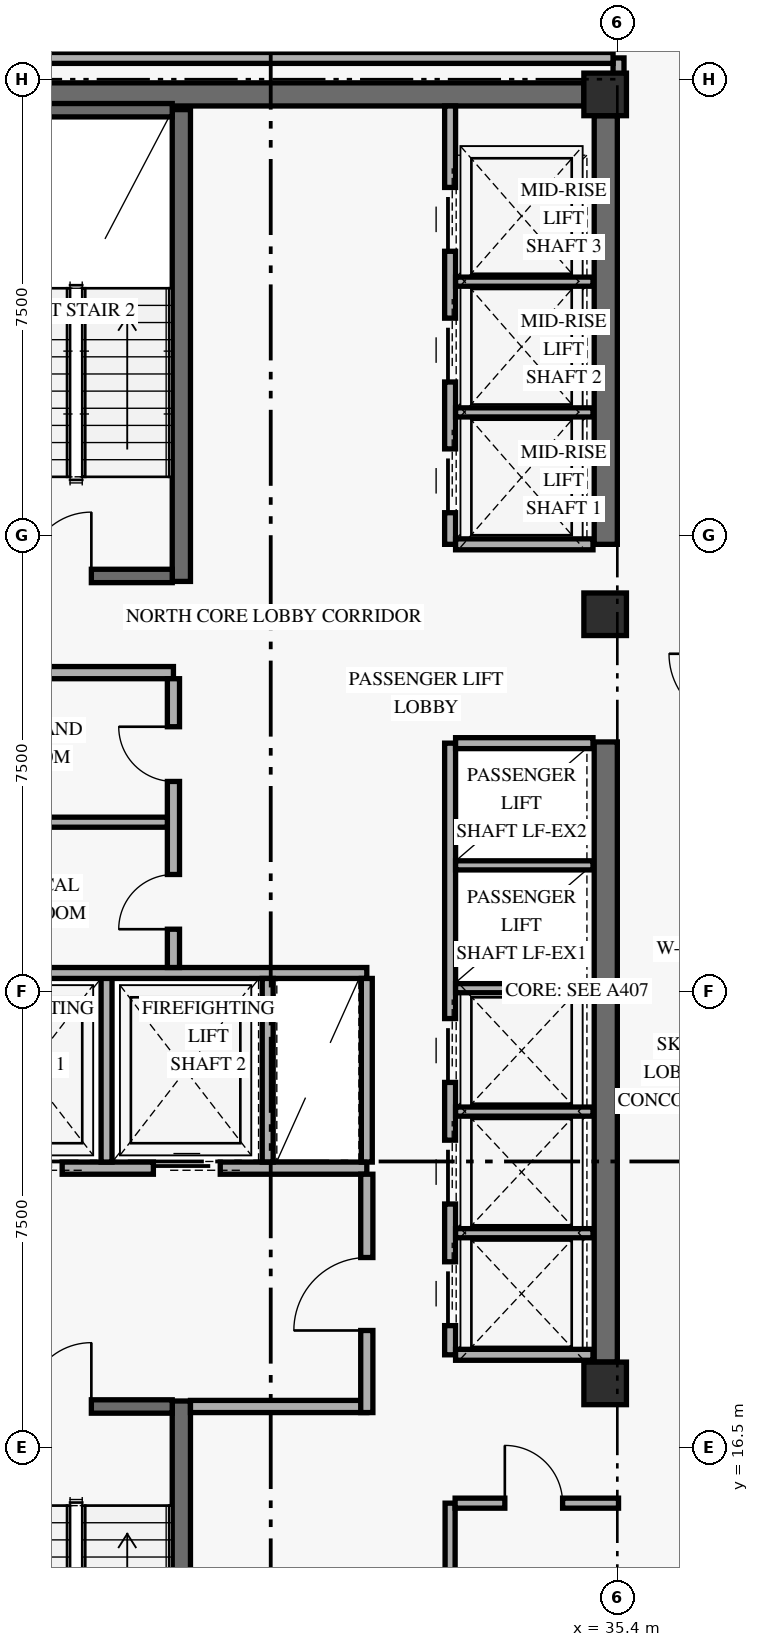
"""IFC4 building model, lengths in metres.
Left out: names, types, materials, properties, quantities, classifications, styles, units other than length and angle.
Written with IfcOpenShell. Run it as: python <this file> out.ifc"""

import sys

from ifc_helpers import new_model, si_unit, direction, frame, frame_2d, origin, origin_2d, place, context, subcontext, project, spatial, rectangle, extrude, element, fill, save


model = new_model("IFC4")
c1 = context("Model", 3, precision=1e-05, world=origin(), true_north=direction((0.0, 1.0)))
c2 = subcontext(c1, "Body", "Model", "MODEL_VIEW")
j1 = project(units=[si_unit("LENGTHUNIT", "METRE"), si_unit("PLANEANGLEUNIT", "RADIAN")], contexts=[c1])
p1 = place(None, origin())
s1 = spatial("IfcSite", under=j1, at=p1, CompositionType="ELEMENT")
p2 = place(p1, origin())
s2 = spatial("IfcBuilding", under=s1, at=p2, CompositionType="ELEMENT")
p3 = place(p2, frame((0.0, 0.0, 192.0)))
s3 = spatial("IfcBuildingStorey", under=s2, at=p3, CompositionType="ELEMENT", Elevation=192.0)
p4 = place(p3, frame((35.21, 17.9, 0.0), z_axis=(0.0, 0.0, 1.0), x_axis=(0.0, 1.0, 0.0)))
e1 = element("IfcWall", 1, at=p4, inside=s3, PredefinedType="SHEAR", context=c2, shape_type="SweptSolid", body=[
    extrude(rectangle(XDim=10.2, YDim=0.38, at=frame_2d((5.1, 0.0))), origin(), (0.0, 0.0, 1.0), 3.348),
])
p5 = place(p3, frame((35.21, 31.35, 0.0), z_axis=(0.0, 0.0, 1.0), x_axis=(0.0, 1.0, 0.0)))
e2 = element("IfcWall", 2, at=p5, inside=s3, PredefinedType="SHEAR", context=c2, shape_type="SweptSolid", body=[
    extrude(rectangle(XDim=7.05, YDim=0.38, at=frame_2d((3.525, 0.0))), origin(), (0.0, 0.0, 1.0), 3.348),
])
p6 = place(p3, frame((24.55, 38.75, 0.0), z_axis=(0.0, 0.0, 1.0), x_axis=(1.0, 0.0, 0.0)))
e3 = element("IfcWall", 3, at=p6, inside=s3, PredefinedType="SHEAR", context=c2, shape_type="SweptSolid", body=[
    extrude(rectangle(XDim=10.3, YDim=0.38, at=frame_2d((5.15, 0.0))), origin(), (0.0, 0.0, 1.0), 3.96),
])
p7 = place(p3, frame((28.23, 9.5, 0.0), z_axis=(0.0, 0.0, 1.0), x_axis=(0.0, 1.0, 0.0)))
e4 = element("IfcWall", 4, at=p7, inside=s3, PredefinedType="SHEAR", context=c2, shape_type="SweptSolid", body=[
    extrude(rectangle(XDim=7.76, YDim=0.3, at=frame_2d((3.88, 0.0))), origin(), (0.0, 0.0, 1.0), 3.96),
])
p8 = place(p3, frame((24.92, 17.17, 0.0), z_axis=(0.0, 0.0, 1.0), x_axis=(1.0, 0.0, 0.0)))
e5 = element("IfcWall", 5, at=p8, inside=s3, PredefinedType="SHEAR", context=c2, shape_type="SweptSolid", body=[
    extrude(rectangle(XDim=3.16, YDim=0.22, at=frame_2d((1.58, 0.0))), origin(), (0.0, 0.0, 1.0), 3.96),
])
p9 = place(p8, frame((0.78, 0.0, 0.0)))
e6 = element("IfcOpeningElement", 6, at=p9, cuts=e5, PredefinedType="OPENING", context=c2, shape_type="SweptSolid", body=[
    extrude(rectangle(XDim=1.05, YDim=2.15, at=frame_2d((0.525, 1.075))), frame((0.0, 0.12, 0.0), z_axis=(0.0, -1.0, 0.0), x_axis=(1.0, 0.0, 0.0)), (0.0, 0.0, 1.0), 0.24),
])
p10 = place(p3, frame((28.23, 30.74, 0.0), z_axis=(0.0, 0.0, 1.0), x_axis=(0.0, 1.0, 0.0)))
e7 = element("IfcWall", 7, at=p10, inside=s3, PredefinedType="SHEAR", context=c2, shape_type="SweptSolid", body=[
    extrude(rectangle(XDim=7.76, YDim=0.3, at=frame_2d((3.88, 0.0))), origin(), (0.0, 0.0, 1.0), 3.96),
])
p11 = place(p3, frame((24.92, 30.83, 0.0), z_axis=(0.0, 0.0, 1.0), x_axis=(1.0, 0.0, 0.0)))
e8 = element("IfcWall", 8, at=p11, inside=s3, PredefinedType="SHEAR", context=c2, shape_type="SweptSolid", body=[
    extrude(rectangle(XDim=3.16, YDim=0.22, at=frame_2d((1.58, 0.0))), origin(), (0.0, 0.0, 1.0), 3.96),
])
p12 = place(p11, frame((0.78, 0.0, 0.0)))
e9 = element("IfcOpeningElement", 9, at=p12, cuts=e8, PredefinedType="OPENING", context=c2, shape_type="SweptSolid", body=[
    extrude(rectangle(XDim=1.05, YDim=2.15, at=frame_2d((0.525, 1.075))), frame((0.0, 0.12, 0.0), z_axis=(0.0, -1.0, 0.0), x_axis=(1.0, 0.0, 0.0)), (0.0, 0.0, 1.0), 0.24),
])
p13 = place(p3, frame((24.92, 38.49, 0.0), z_axis=(0.0, 0.0, 1.0), x_axis=(1.0, 0.0, 0.0)))
e10 = element("IfcWall", 10, at=p13, inside=s3, PredefinedType="SHEAR", context=c2, shape_type="SweptSolid", body=[
    extrude(rectangle(XDim=3.16, YDim=0.22, at=frame_2d((1.58, 0.0))), origin(), (0.0, 0.0, 1.0), 3.96),
])
for number, where, z_axis, x_axis in (
    (11, (35.2, 17.55, 0.0), (0.0, 0.0, 1.0), (1.0, 0.0, 0.0)),
    (12, (35.2, 30.2, 0.0), (0.0, 0.0, 1.0), (1.0, 0.0, 0.0)),
    (13, (35.2, 38.75, 0.0), (0.0, 0.0, 1.0), (1.0, 0.0, 0.0)),
):
    element("IfcColumn", number, at=place(p3, frame(where, z_axis=z_axis, x_axis=x_axis)), inside=s3, PredefinedType="COLUMN", context=c2, shape_type="SweptSolid", body=[
        extrude(rectangle(XDim=0.7, YDim=0.7, at=origin_2d()), origin(), (0.0, 0.0, 1.0), 4.2),
    ])
p14 = place(p3, frame((24.45, 21.09, 0.0), z_axis=(0.0, 0.0, 1.0), x_axis=(1.0, 0.0, 0.0)))
e14 = element("IfcWall", 14, at=p14, inside=s3, PredefinedType="STANDARD", context=c2, shape_type="SweptSolid", body=[
    extrude(rectangle(XDim=6.83, YDim=0.2, at=frame_2d((3.415, 0.0))), origin(), (0.0, 0.0, 1.0), 3.96),
])
p15 = place(p14, frame((0.72, 0.0, 0.0)))
e15 = element("IfcOpeningElement", 15, at=p15, cuts=e14, PredefinedType="OPENING", context=c2, shape_type="SweptSolid", body=[
    extrude(rectangle(XDim=1.1, YDim=2.2, at=frame_2d((0.55, 1.1))), frame((0.0, 0.11, 0.0), z_axis=(0.0, -1.0, 0.0), x_axis=(1.0, 0.0, 0.0)), (0.0, 0.0, 1.0), 0.22),
])
p16 = place(p14, frame((3.32, 0.0, 0.0)))
e16 = element("IfcOpeningElement", 16, at=p16, cuts=e14, PredefinedType="OPENING", context=c2, shape_type="SweptSolid", body=[
    extrude(rectangle(XDim=1.1, YDim=2.2, at=frame_2d((0.55, 1.1))), frame((0.0, 0.11, 0.0), z_axis=(0.0, -1.0, 0.0), x_axis=(1.0, 0.0, 0.0)), (0.0, 0.0, 1.0), 0.22),
])
p17 = place(p3, frame((28.38, 17.17, 0.0), z_axis=(0.0, 0.0, 1.0), x_axis=(1.0, 0.0, 0.0)))
e17 = element("IfcWall", 17, at=p17, inside=s3, PredefinedType="STANDARD", context=c2, shape_type="SweptSolid", body=[
    extrude(rectangle(XDim=2.9, YDim=0.2, at=frame_2d((1.45, 0.0))), origin(), (0.0, 0.0, 1.0), 3.96),
])
p18 = place(p3, frame((31.28, 17.07, 0.0), z_axis=(0.0, 0.0, 1.0), x_axis=(0.0, 1.0, 0.0)))
e18 = element("IfcWall", 18, at=p18, inside=s3, PredefinedType="STANDARD", context=c2, shape_type="SweptSolid", body=[
    extrude(rectangle(XDim=3.92, YDim=0.2, at=frame_2d((1.96, 0.0))), origin(), (0.0, 0.0, 1.0), 3.33),
])
p19 = place(p18, frame((1.35, 0.0, 0.0)))
e19 = element("IfcOpeningElement", 19, at=p19, cuts=e18, PredefinedType="OPENING", context=c2, shape_type="SweptSolid", body=[
    extrude(rectangle(XDim=1.2, YDim=2.15, at=frame_2d((0.6, 1.075))), frame((0.0, 0.11, 0.0), z_axis=(0.0, -1.0, 0.0), x_axis=(1.0, 0.0, 0.0)), (0.0, 0.0, 1.0), 0.22),
])
p20 = place(p3, frame((27.0, 21.19, 0.0), z_axis=(0.0, 0.0, 1.0), x_axis=(0.0, 1.0, 0.0)))
e20 = element("IfcWall", 20, at=p20, inside=s3, PredefinedType="STANDARD", context=c2, shape_type="SweptSolid", body=[
    extrude(rectangle(XDim=3.11, YDim=0.18, at=frame_2d((1.555, 0.0))), origin(), (0.0, 0.0, 1.0), 3.96),
])
p21 = place(p3, frame((24.45, 24.3, 0.0), z_axis=(0.0, 0.0, 1.0), x_axis=(1.0, 0.0, 0.0)))
e21 = element("IfcWall", 21, at=p21, inside=s3, PredefinedType="STANDARD", context=c2, shape_type="SweptSolid", body=[
    extrude(rectangle(XDim=6.83, YDim=0.18, at=frame_2d((3.415, 0.0))), origin(), (0.0, 0.0, 1.0), 3.96),
])
for number, where, z_axis, x_axis in (
    (22, (29.65, 21.19, 0.0), (0.0, 0.0, 1.0), (0.0, 1.0, 0.0)),
    (23, (31.28, 21.19, 0.0), (0.0, 0.0, 1.0), (0.0, 1.0, 0.0)),
):
    element("IfcWall", number, at=place(p3, frame(where, z_axis=z_axis, x_axis=x_axis)), inside=s3, PredefinedType="STANDARD", context=c2, shape_type="SweptSolid", body=[
        extrude(rectangle(XDim=3.02, YDim=0.18, at=frame_2d((1.51, 0.0))), origin(), (0.0, 0.0, 1.0), 3.96),
    ])
p22 = place(p3, frame((24.45, 29.24, 0.0), z_axis=(0.0, 0.0, 1.0), x_axis=(1.0, 0.0, 0.0)))
e24 = element("IfcWall", 24, at=p22, inside=s3, PredefinedType="STANDARD", context=c2, shape_type="SweptSolid", body=[
    extrude(rectangle(XDim=3.65, YDim=0.2, at=frame_2d((1.825, 0.0))), origin(), (0.0, 0.0, 1.0), 3.96),
])
p23 = place(p3, frame((28.1, 24.39, 0.0), z_axis=(0.0, 0.0, 1.0), x_axis=(0.0, 1.0, 0.0)))
e25 = element("IfcWall", 25, at=p23, inside=s3, PredefinedType="STANDARD", context=c2, shape_type="SweptSolid", body=[
    extrude(rectangle(XDim=4.75, YDim=0.2, at=frame_2d((2.375, 0.0))), origin(), (0.0, 0.0, 1.0), 3.96),
])
p24 = place(p23, frame((0.63, 0.0, 0.0)))
e26 = element("IfcOpeningElement", 26, at=p24, cuts=e25, PredefinedType="OPENING", context=c2, shape_type="SweptSolid", body=[
    extrude(rectangle(XDim=0.9, YDim=2.1, at=frame_2d((0.45, 1.05))), frame((0.0, 0.11, 0.0), z_axis=(0.0, -1.0, 0.0), x_axis=(1.0, 0.0, 0.0)), (0.0, 0.0, 1.0), 0.22),
])
p25 = place(p23, frame((3.06, 0.0, 0.0)))
e27 = element("IfcOpeningElement", 27, at=p25, cuts=e25, PredefinedType="OPENING", context=c2, shape_type="SweptSolid", body=[
    extrude(rectangle(XDim=0.9, YDim=2.1, at=frame_2d((0.45, 1.05))), frame((0.0, 0.11, 0.0), z_axis=(0.0, -1.0, 0.0), x_axis=(1.0, 0.0, 0.0)), (0.0, 0.0, 1.0), 0.22),
])
p26 = place(p3, frame((24.45, 26.78, 0.0), z_axis=(0.0, 0.0, 1.0), x_axis=(1.0, 0.0, 0.0)))
e28 = element("IfcWall", 28, at=p26, inside=s3, PredefinedType="PARTITIONING", context=c2, shape_type="SweptSolid", body=[
    extrude(rectangle(XDim=3.55, YDim=0.165, at=frame_2d((1.775, 0.0))), origin(), (0.0, 0.0, 1.0), 3.96),
])
p27 = place(p3, frame((32.65, 18.02, 0.0), z_axis=(0.0, 0.0, 1.0), x_axis=(0.0, 1.0, 0.0)))
e29 = element("IfcWall", 29, at=p27, inside=s3, PredefinedType="STANDARD", context=c2, shape_type="SweptSolid", body=[
    extrude(rectangle(XDim=10.06, YDim=0.18, at=frame_2d((5.03, 0.0))), origin(), (0.0, 0.0, 1.0), 3.96),
])
p28 = place(p27, frame((0.48, 0.0, 0.0)))
e30 = element("IfcOpeningElement", 30, at=p28, cuts=e29, PredefinedType="OPENING", context=c2, shape_type="SweptSolid", body=[
    extrude(rectangle(XDim=1.05, YDim=2.2, at=frame_2d((0.525, 1.1))), frame((0.0, 0.1, 0.0), z_axis=(0.0, -1.0, 0.0), x_axis=(1.0, 0.0, 0.0)), (0.0, 0.0, 1.0), 0.2),
])
p29 = place(p27, frame((2.48, 0.0, 0.0)))
e31 = element("IfcOpeningElement", 31, at=p29, cuts=e29, PredefinedType="OPENING", context=c2, shape_type="SweptSolid", body=[
    extrude(rectangle(XDim=1.05, YDim=2.2, at=frame_2d((0.525, 1.1))), frame((0.0, 0.1, 0.0), z_axis=(0.0, -1.0, 0.0), x_axis=(1.0, 0.0, 0.0)), (0.0, 0.0, 1.0), 0.2),
])
p30 = place(p27, frame((4.48, 0.0, 0.0)))
e32 = element("IfcOpeningElement", 32, at=p30, cuts=e29, PredefinedType="OPENING", context=c2, shape_type="SweptSolid", body=[
    extrude(rectangle(XDim=1.05, YDim=2.2, at=frame_2d((0.525, 1.1))), frame((0.0, 0.1, 0.0), z_axis=(0.0, -1.0, 0.0), x_axis=(1.0, 0.0, 0.0)), (0.0, 0.0, 1.0), 0.2),
])
for number, where, z_axis, x_axis in (
    (33, (32.74, 18.02, 0.0), (0.0, 0.0, 1.0), (1.0, 0.0, 0.0)),
    (34, (32.74, 28.08, 0.0), (0.0, 0.0, 1.0), (1.0, 0.0, 0.0)),
):
    element("IfcWall", number, at=place(p3, frame(where, z_axis=z_axis, x_axis=x_axis)), inside=s3, PredefinedType="STANDARD", context=c2, shape_type="SweptSolid", body=[
        extrude(rectangle(XDim=2.26, YDim=0.18, at=frame_2d((1.13, 0.0))), origin(), (0.0, 0.0, 1.0), 3.96),
    ])
for number, where, z_axis, x_axis in (
    (35, (32.74, 20.02, 0.0), (0.0, 0.0, 1.0), (1.0, 0.0, 0.0)),
    (36, (32.74, 22.02, 0.0), (0.0, 0.0, 1.0), (1.0, 0.0, 0.0)),
    (37, (32.74, 24.05, 0.0), (0.0, 0.0, 1.0), (1.0, 0.0, 0.0)),
    (38, (32.74, 26.07, 0.0), (0.0, 0.0, 1.0), (1.0, 0.0, 0.0)),
):
    element("IfcWall", number, at=place(p3, frame(where, z_axis=z_axis, x_axis=x_axis)), inside=s3, PredefinedType="STANDARD", context=c2, shape_type="SweptSolid", body=[
        extrude(rectangle(XDim=2.26, YDim=0.15, at=frame_2d((1.13, 0.0))), origin(), (0.0, 0.0, 1.0), 3.96),
    ])
p31 = place(p3, frame((32.65, 31.35, 0.0), z_axis=(0.0, 0.0, 1.0), x_axis=(0.0, 1.0, 0.0)))
e39 = element("IfcWall", 39, at=p31, inside=s3, PredefinedType="STANDARD", context=c2, shape_type="SweptSolid", body=[
    extrude(rectangle(XDim=7.21, YDim=0.18, at=frame_2d((3.605, 0.0))), origin(), (0.0, 0.0, 1.0), 3.96),
])
p32 = place(p31, frame((0.52, 0.0, 0.0)))
e40 = element("IfcOpeningElement", 40, at=p32, cuts=e39, PredefinedType="OPENING", context=c2, shape_type="SweptSolid", body=[
    extrude(rectangle(XDim=1.05, YDim=2.2, at=frame_2d((0.525, 1.1))), frame((0.0, 0.1, 0.0), z_axis=(0.0, -1.0, 0.0), x_axis=(1.0, 0.0, 0.0)), (0.0, 0.0, 1.0), 0.2),
])
p33 = place(p31, frame((2.67, 0.0, 0.0)))
e41 = element("IfcOpeningElement", 41, at=p33, cuts=e39, PredefinedType="OPENING", context=c2, shape_type="SweptSolid", body=[
    extrude(rectangle(XDim=1.05, YDim=2.2, at=frame_2d((0.525, 1.1))), frame((0.0, 0.1, 0.0), z_axis=(0.0, -1.0, 0.0), x_axis=(1.0, 0.0, 0.0)), (0.0, 0.0, 1.0), 0.2),
])
p34 = place(p31, frame((4.82, 0.0, 0.0)))
e42 = element("IfcOpeningElement", 42, at=p34, cuts=e39, PredefinedType="OPENING", context=c2, shape_type="SweptSolid", body=[
    extrude(rectangle(XDim=1.05, YDim=2.2, at=frame_2d((0.525, 1.1))), frame((0.0, 0.1, 0.0), z_axis=(0.0, -1.0, 0.0), x_axis=(1.0, 0.0, 0.0)), (0.0, 0.0, 1.0), 0.2),
])
p35 = place(p3, frame((32.74, 31.35, 0.0), z_axis=(0.0, 0.0, 1.0), x_axis=(1.0, 0.0, 0.0)))
e43 = element("IfcWall", 43, at=p35, inside=s3, PredefinedType="STANDARD", context=c2, shape_type="SweptSolid", body=[
    extrude(rectangle(XDim=2.26, YDim=0.18, at=frame_2d((1.13, 0.0))), origin(), (0.0, 0.0, 1.0), 3.96),
])
for number, where, z_axis, x_axis in (
    (44, (32.74, 33.52, 0.0), (0.0, 0.0, 1.0), (1.0, 0.0, 0.0)),
    (45, (32.74, 35.67, 0.0), (0.0, 0.0, 1.0), (1.0, 0.0, 0.0)),
):
    element("IfcWall", number, at=place(p3, frame(where, z_axis=z_axis, x_axis=x_axis)), inside=s3, PredefinedType="STANDARD", context=c2, shape_type="SweptSolid", body=[
        extrude(rectangle(XDim=2.26, YDim=0.15, at=frame_2d((1.13, 0.0))), origin(), (0.0, 0.0, 1.0), 3.96),
    ])
p36 = place(p3, frame((35.42, 38.75, 0.0), z_axis=(0.0, 0.0, 1.0), x_axis=(0.0, 1.0, 0.0)))
e46 = element("IfcWall", 46, at=p36, inside=s3, PredefinedType="STANDARD", context=c2, shape_type="SweptSolid", body=[
    extrude(rectangle(XDim=0.6, YDim=0.18, at=frame_2d((0.3, 0.0))), origin(), (0.0, 0.0, 1.0), 3.33),
])
p37 = place(p3, frame((32.65, 9.5, 0.0), z_axis=(0.0, 0.0, 1.0), x_axis=(0.0, 1.0, 0.0)))
e47 = element("IfcWall", 47, at=p37, inside=s3, PredefinedType="PARTITIONING", context=c2, shape_type="SweptSolid", body=[
    extrude(rectangle(XDim=6.08, YDim=0.165, at=frame_2d((3.04, 0.0))), origin(), (0.0, 0.0, 1.0), 3.96),
])
p38 = place(p3, frame((32.732, 15.58, 0.0), z_axis=(0.0, 0.0, 1.0), x_axis=(1.0, 0.0, 0.0)))
e48 = element("IfcWall", 48, at=p38, inside=s3, PredefinedType="PARTITIONING", context=c2, shape_type="SweptSolid", body=[
    extrude(rectangle(XDim=2.688, YDim=0.165, at=frame_2d((1.344, 0.0))), origin(), (0.0, 0.0, 1.0), 3.33),
])
p39 = place(p38, frame((0.817, 0.0, 0.0)))
e49 = element("IfcOpeningElement", 49, at=p39, cuts=e48, PredefinedType="OPENING", context=c2, shape_type="SweptSolid", body=[
    extrude(rectangle(XDim=0.95, YDim=2.15, at=frame_2d((0.475, 1.075))), frame((0.0, 0.093, 0.0), z_axis=(0.0, -1.0, 0.0), x_axis=(1.0, 0.0, 0.0)), (0.0, 0.0, 1.0), 0.185),
])
p40 = place(p3, frame((23.85, 39.35, 0.0), z_axis=(0.0, 0.0, 1.0), x_axis=(1.0, 0.0, 0.0)))
e50 = element("IfcWall", 50, at=p40, inside=s3, PredefinedType="STANDARD", context=c2, shape_type="SweptSolid", body=[
    extrude(rectangle(XDim=11.48, YDim=0.18, at=frame_2d((5.74, 0.0))), origin(), (0.0, 0.0, 1.0), 3.33),
])
p41 = place(p9, frame((1.05, 0.0, 0.0), z_axis=(0.0, 0.0, 1.0), x_axis=(-1.0, 0.0, 0.0)))
e51 = element("IfcDoor", 51, at=p41, inside=s3, OperationType="SINGLE_SWING_LEFT", PredefinedType="DOOR", context=c2, shape_type="SweptSolid", body=[
    extrude(rectangle(XDim=1.05, YDim=2.15, at=frame_2d((0.525, 1.075))), frame((0.0, 0.025, 0.0), z_axis=(0.0, -1.0, 0.0), x_axis=(1.0, 0.0, 0.0)), (0.0, 0.0, 1.0), 0.05),
])
fill(e6, e51)
p42 = place(p12, origin())
e52 = element("IfcDoor", 52, at=p42, inside=s3, OperationType="SINGLE_SWING_RIGHT", PredefinedType="DOOR", context=c2, shape_type="SweptSolid", body=[
    extrude(rectangle(XDim=1.05, YDim=2.15, at=frame_2d((0.525, 1.075))), frame((0.0, 0.025, 0.0), z_axis=(0.0, -1.0, 0.0), x_axis=(1.0, 0.0, 0.0)), (0.0, 0.0, 1.0), 0.05),
])
fill(e9, e52)
p43 = place(p15, origin())
e53 = element("IfcDoor", 53, at=p43, inside=s3, OperationType="SLIDING_TO_LEFT", PredefinedType="DOOR", context=c2, shape_type="SweptSolid", body=[
    extrude(rectangle(XDim=1.1, YDim=2.2, at=frame_2d((0.55, 1.1))), frame((0.0, 0.025, 0.0), z_axis=(0.0, -1.0, 0.0), x_axis=(1.0, 0.0, 0.0)), (0.0, 0.0, 1.0), 0.05),
])
fill(e15, e53)
p44 = place(p16, origin())
e54 = element("IfcDoor", 54, at=p44, inside=s3, OperationType="SLIDING_TO_LEFT", PredefinedType="DOOR", context=c2, shape_type="SweptSolid", body=[
    extrude(rectangle(XDim=1.1, YDim=2.2, at=frame_2d((0.55, 1.1))), frame((0.0, 0.025, 0.0), z_axis=(0.0, -1.0, 0.0), x_axis=(1.0, 0.0, 0.0)), (0.0, 0.0, 1.0), 0.05),
])
fill(e16, e54)
p45 = place(p19, origin())
e55 = element("IfcDoor", 55, at=p45, inside=s3, OperationType="SINGLE_SWING_LEFT", PredefinedType="DOOR", context=c2, shape_type="SweptSolid", body=[
    extrude(rectangle(XDim=1.2, YDim=2.15, at=frame_2d((0.6, 1.075))), frame((0.0, 0.025, 0.0), z_axis=(0.0, -1.0, 0.0), x_axis=(1.0, 0.0, 0.0)), (0.0, 0.0, 1.0), 0.05),
])
fill(e19, e55)
p46 = place(p24, origin())
e56 = element("IfcDoor", 56, at=p46, inside=s3, OperationType="SINGLE_SWING_LEFT", PredefinedType="DOOR", context=c2, shape_type="SweptSolid", body=[
    extrude(rectangle(XDim=0.9, YDim=2.1, at=frame_2d((0.45, 1.05))), frame((0.0, 0.025, 0.0), z_axis=(0.0, -1.0, 0.0), x_axis=(1.0, 0.0, 0.0)), (0.0, 0.0, 1.0), 0.05),
])
fill(e26, e56)
p47 = place(p25, origin())
e57 = element("IfcDoor", 57, at=p47, inside=s3, OperationType="SINGLE_SWING_RIGHT", PredefinedType="DOOR", context=c2, shape_type="SweptSolid", body=[
    extrude(rectangle(XDim=0.9, YDim=2.1, at=frame_2d((0.45, 1.05))), frame((0.0, 0.025, 0.0), z_axis=(0.0, -1.0, 0.0), x_axis=(1.0, 0.0, 0.0)), (0.0, 0.0, 1.0), 0.05),
])
fill(e27, e57)
p48 = place(p28, origin())
e58 = element("IfcDoor", 58, at=p48, inside=s3, OperationType="SLIDING_TO_LEFT", PredefinedType="DOOR", context=c2, shape_type="SweptSolid", body=[
    extrude(rectangle(XDim=1.05, YDim=2.2, at=frame_2d((0.525, 1.1))), frame((0.0, 0.025, 0.0), z_axis=(0.0, -1.0, 0.0), x_axis=(1.0, 0.0, 0.0)), (0.0, 0.0, 1.0), 0.05),
])
fill(e30, e58)
p49 = place(p29, origin())
e59 = element("IfcDoor", 59, at=p49, inside=s3, OperationType="SLIDING_TO_LEFT", PredefinedType="DOOR", context=c2, shape_type="SweptSolid", body=[
    extrude(rectangle(XDim=1.05, YDim=2.2, at=frame_2d((0.525, 1.1))), frame((0.0, 0.025, 0.0), z_axis=(0.0, -1.0, 0.0), x_axis=(1.0, 0.0, 0.0)), (0.0, 0.0, 1.0), 0.05),
])
fill(e31, e59)
p50 = place(p30, origin())
e60 = element("IfcDoor", 60, at=p50, inside=s3, OperationType="SLIDING_TO_LEFT", PredefinedType="DOOR", context=c2, shape_type="SweptSolid", body=[
    extrude(rectangle(XDim=1.05, YDim=2.2, at=frame_2d((0.525, 1.1))), frame((0.0, 0.025, 0.0), z_axis=(0.0, -1.0, 0.0), x_axis=(1.0, 0.0, 0.0)), (0.0, 0.0, 1.0), 0.05),
])
fill(e32, e60)
p51 = place(p32, origin())
e61 = element("IfcDoor", 61, at=p51, inside=s3, OperationType="SLIDING_TO_LEFT", PredefinedType="DOOR", context=c2, shape_type="SweptSolid", body=[
    extrude(rectangle(XDim=1.05, YDim=2.2, at=frame_2d((0.525, 1.1))), frame((0.0, 0.025, 0.0), z_axis=(0.0, -1.0, 0.0), x_axis=(1.0, 0.0, 0.0)), (0.0, 0.0, 1.0), 0.05),
])
fill(e40, e61)
p52 = place(p33, origin())
e62 = element("IfcDoor", 62, at=p52, inside=s3, OperationType="SLIDING_TO_LEFT", PredefinedType="DOOR", context=c2, shape_type="SweptSolid", body=[
    extrude(rectangle(XDim=1.05, YDim=2.2, at=frame_2d((0.525, 1.1))), frame((0.0, 0.025, 0.0), z_axis=(0.0, -1.0, 0.0), x_axis=(1.0, 0.0, 0.0)), (0.0, 0.0, 1.0), 0.05),
])
fill(e41, e62)
p53 = place(p34, origin())
e63 = element("IfcDoor", 63, at=p53, inside=s3, OperationType="SLIDING_TO_LEFT", PredefinedType="DOOR", context=c2, shape_type="SweptSolid", body=[
    extrude(rectangle(XDim=1.05, YDim=2.2, at=frame_2d((0.525, 1.1))), frame((0.0, 0.025, 0.0), z_axis=(0.0, -1.0, 0.0), x_axis=(1.0, 0.0, 0.0)), (0.0, 0.0, 1.0), 0.05),
])
fill(e42, e63)
p54 = place(p39, origin())
e64 = element("IfcDoor", 64, at=p54, inside=s3, OperationType="SINGLE_SWING_LEFT", PredefinedType="DOOR", context=c2, shape_type="SweptSolid", body=[
    extrude(rectangle(XDim=0.95, YDim=2.15, at=frame_2d((0.475, 1.075))), frame((0.0, 0.025, 0.0), z_axis=(0.0, -1.0, 0.0), x_axis=(1.0, 0.0, 0.0)), (0.0, 0.0, 1.0), 0.05),
])
fill(e49, e64)
save(model, sys.argv[1])
